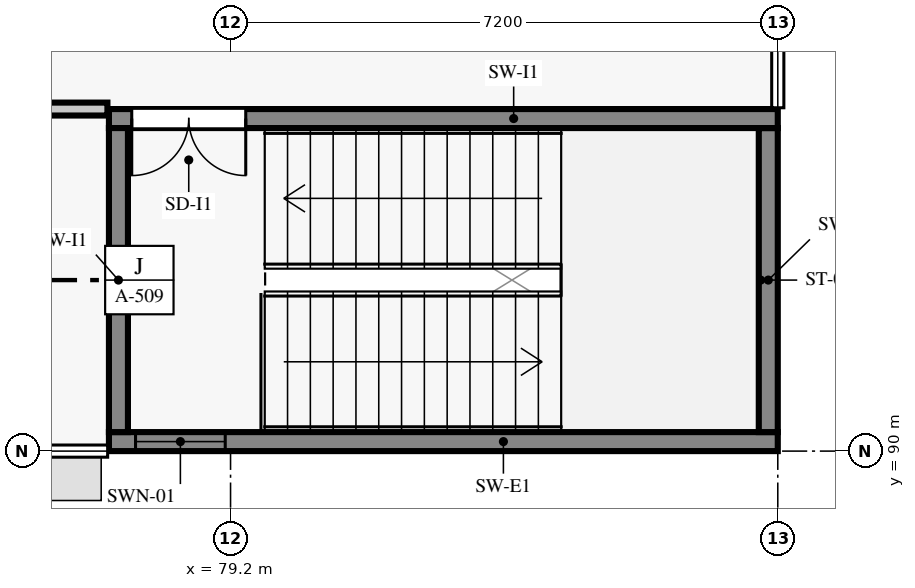
"""IFC4 building model, lengths in metres.
Left out: names, types, materials, properties, quantities, classifications, styles, units other than length and angle.
Written with IfcOpenShell. Run it as: python <this file> out.ifc"""

import sys

from ifc_helpers import new_model, si_unit, direction, frame, frame_2d, origin, place, context, subcontext, project, spatial, rectangle, extrude, element, fill, save


model = new_model("IFC4")
c1 = context("Model", 3, precision=1e-05, world=origin(), true_north=direction((0.0, 1.0)))
c2 = subcontext(c1, "Body", "Model", "MODEL_VIEW")
j1 = project(units=[si_unit("LENGTHUNIT", "METRE"), si_unit("PLANEANGLEUNIT", "RADIAN")], contexts=[c1])
p1 = place(None, origin())
s1 = spatial("IfcSite", under=j1, at=p1, CompositionType="ELEMENT")
p2 = place(p1, origin())
s2 = spatial("IfcBuilding", under=s1, at=p2, CompositionType="ELEMENT")
p3 = place(p2, frame((0.0, 0.0, 9.6)))
s3 = spatial("IfcBuildingStorey", under=s2, at=p3, CompositionType="ELEMENT", Elevation=9.6)
p4 = place(p3, frame((77.6, 90.125, 0.0), z_axis=(0.0, 0.0, 1.0), x_axis=(1.0, 0.0, 0.0)))
e1 = element("IfcWall", 1, at=p4, inside=s3, PredefinedType="SHEAR", context=c2, shape_type="SweptSolid", body=[
    extrude(rectangle(XDim=8.8, YDim=0.25, at=frame_2d((4.4, 0.0))), origin(), (0.0, 0.0, 1.0), 3.95),
])
p5 = place(p4, frame((0.35, 0.0, 0.92)))
e2 = element("IfcOpeningElement", 2, at=p5, cuts=e1, PredefinedType="OPENING", context=c2, shape_type="SweptSolid", body=[
    extrude(rectangle(XDim=1.18, YDim=1.48, at=frame_2d((0.59, 0.74))), frame((0.0, 0.135, 0.0), z_axis=(0.0, -1.0, 0.0), x_axis=(1.0, 0.0, 0.0)), (0.0, 0.0, 1.0), 0.27),
])
p6 = place(p3, frame((86.275, 90.25, 0.0), z_axis=(0.0, 0.0, 1.0), x_axis=(0.0, 1.0, 0.0)))
e3 = element("IfcWall", 3, at=p6, inside=s3, PredefinedType="SHEAR", context=c2, shape_type="SweptSolid", body=[
    extrude(rectangle(XDim=4.0, YDim=0.25, at=frame_2d((2.0, 0.0))), origin(), (0.0, 0.0, 1.0), 3.95),
])
p7 = place(p3, frame((86.4, 94.375, 0.0), z_axis=(0.0, 0.0, 1.0), x_axis=(-1.0, 0.0, 0.0)))
e4 = element("IfcWall", 4, at=p7, inside=s3, PredefinedType="SHEAR", context=c2, shape_type="SweptSolid", body=[
    extrude(rectangle(XDim=8.8, YDim=0.25, at=frame_2d((4.4, 0.0))), origin(), (0.0, 0.0, 1.0), 3.95),
])
p8 = place(p7, frame((7.0, 0.0, 0.0)))
e5 = element("IfcOpeningElement", 5, at=p8, cuts=e4, PredefinedType="OPENING", context=c2, shape_type="SweptSolid", body=[
    extrude(rectangle(XDim=1.5, YDim=2.15, at=frame_2d((0.75, 1.075))), frame((0.0, 0.135, 0.0), z_axis=(0.0, -1.0, 0.0), x_axis=(1.0, 0.0, 0.0)), (0.0, 0.0, 1.0), 0.27),
])
p9 = place(p3, frame((77.725, 94.25, 0.0), z_axis=(0.0, 0.0, 1.0), x_axis=(0.0, -1.0, 0.0)))
e6 = element("IfcWall", 6, at=p9, inside=s3, PredefinedType="SHEAR", context=c2, shape_type="SweptSolid", body=[
    extrude(rectangle(XDim=4.0, YDim=0.25, at=frame_2d((2.0, 0.0))), origin(), (0.0, 0.0, 1.0), 3.95),
])
p10 = place(p3, frame((71.02, 94.5, 0.0), z_axis=(0.0, 0.0, 1.0), x_axis=(1.0, 0.0, 0.0)))
e7 = element("IfcWall", 7, at=p10, inside=s3, PredefinedType="PARTITIONING", context=c2, shape_type="SweptSolid", body=[
    extrude(rectangle(XDim=6.56, YDim=0.17, at=frame_2d((3.28, 0.0))), origin(), (0.0, 0.0, 1.0), 3.4),
])
p11 = place(p10, frame((3.97, 0.0, 0.0)))
e8 = element("IfcOpeningElement", 8, at=p11, cuts=e7, PredefinedType="OPENING", context=c2, shape_type="SweptSolid", body=[
    extrude(rectangle(XDim=1.1, YDim=2.08, at=frame_2d((0.55, 1.04))), frame((0.0, 0.095, 0.0), z_axis=(0.0, -1.0, 0.0), x_axis=(1.0, 0.0, 0.0)), (0.0, 0.0, 1.0), 0.19),
])
p12 = place(p5, origin())
e9 = element("IfcWindow", 9, at=p12, inside=s3, PartitioningType="SINGLE_PANEL", PredefinedType="WINDOW", context=c2, shape_type="SweptSolid", body=[
    extrude(rectangle(XDim=1.18, YDim=1.48, at=frame_2d((0.59, 0.74))), frame((0.0, 0.03, 0.0), z_axis=(0.0, -1.0, 0.0), x_axis=(1.0, 0.0, 0.0)), (0.0, 0.0, 1.0), 0.06),
])
fill(e2, e9)
p13 = place(p8, origin())
e10 = element("IfcDoor", 10, at=p13, inside=s3, OperationType="DOUBLE_DOOR_SINGLE_SWING", PredefinedType="DOOR", context=c2, shape_type="SweptSolid", body=[
    extrude(rectangle(XDim=1.5, YDim=2.15, at=frame_2d((0.75, 1.075))), frame((0.0, 0.025, 0.0), z_axis=(0.0, -1.0, 0.0), x_axis=(1.0, 0.0, 0.0)), (0.0, 0.0, 1.0), 0.05),
])
fill(e5, e10)
save(model, sys.argv[1])
